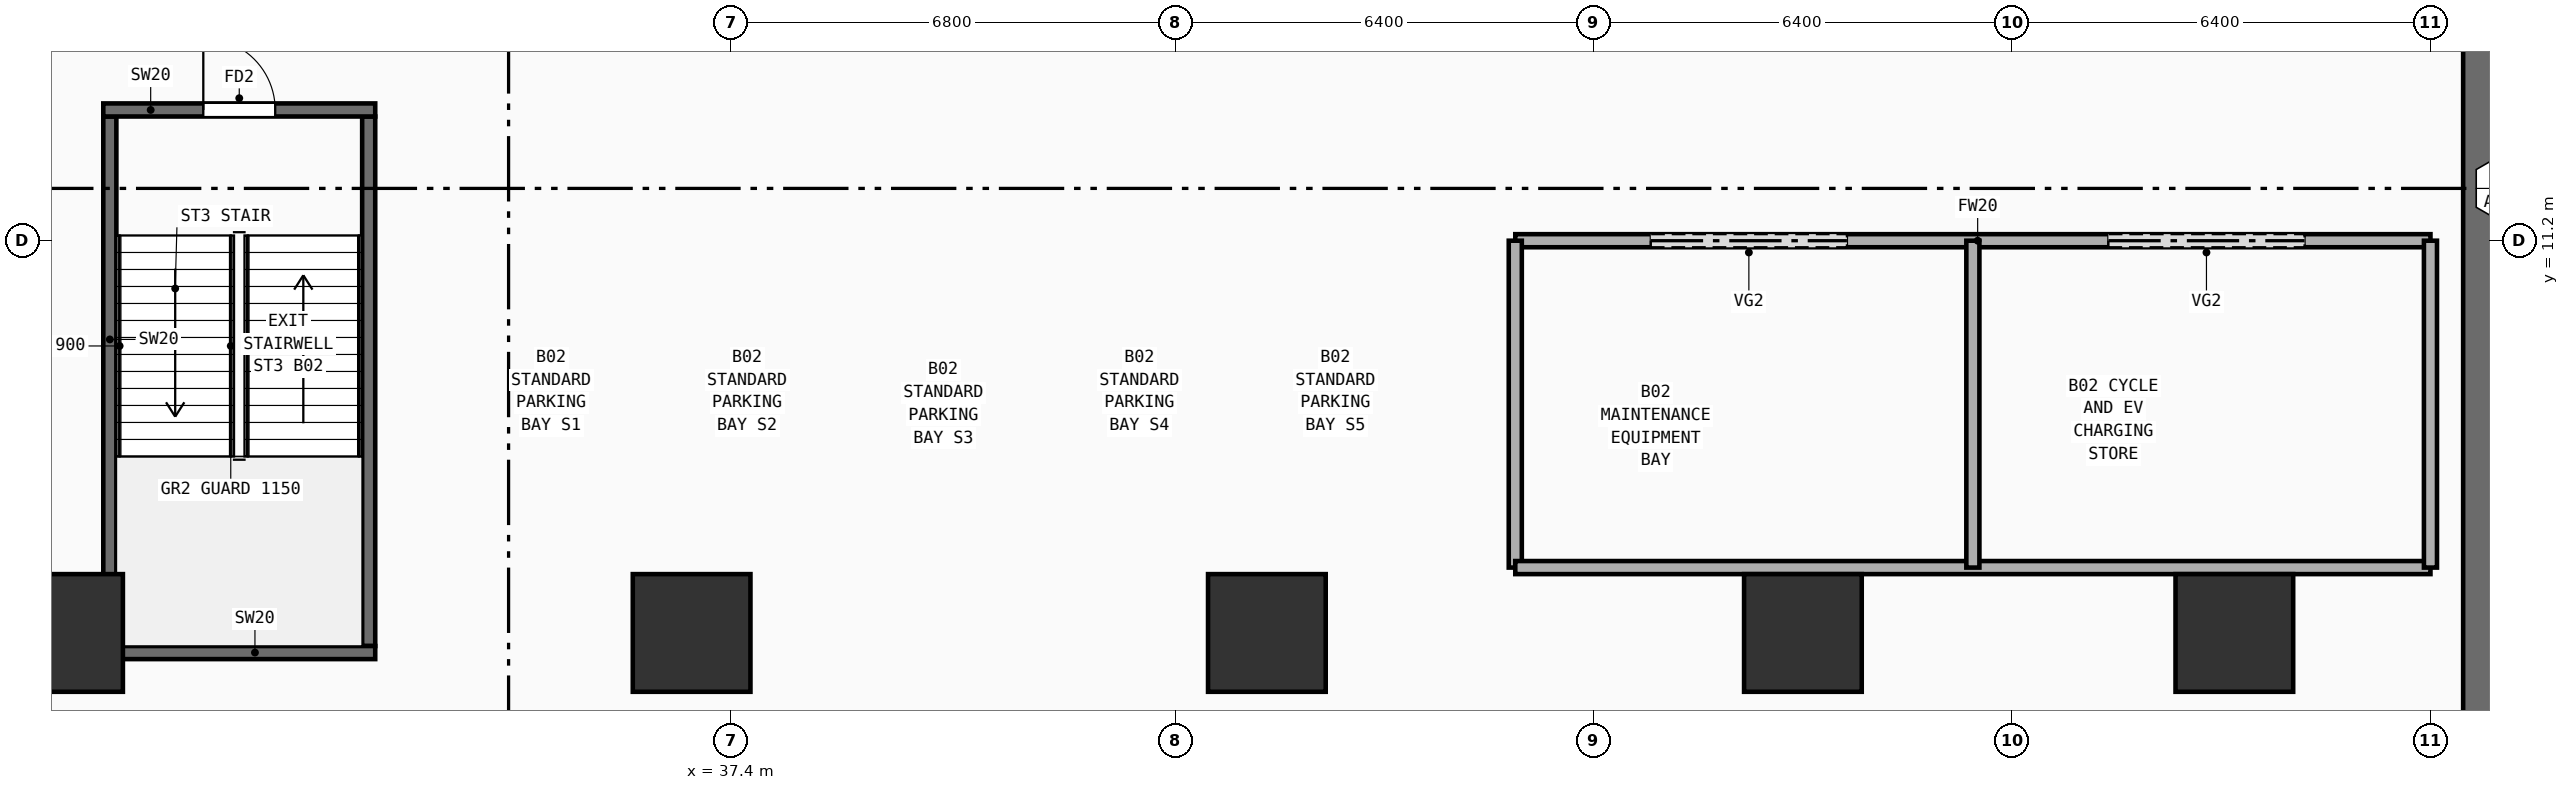
"""IFC4 building model, lengths in metres.
Left out: names, types, materials, properties, quantities, classifications, styles, units other than length and angle.
Written with IfcOpenShell. Run it as: python <this file> out.ifc"""

import sys

from ifc_helpers import new_model, si_unit, direction, frame, frame_2d, origin, origin_2d, place, context, subcontext, project, spatial, rectangle, extrude, element, fill, save


model = new_model("IFC4")
c1 = context("Model", 3, precision=1e-05, world=origin(), true_north=direction((0.0, 1.0)))
c2 = subcontext(c1, "Body", "Model", "MODEL_VIEW")
j1 = project(units=[si_unit("LENGTHUNIT", "METRE"), si_unit("PLANEANGLEUNIT", "RADIAN")], contexts=[c1])
p1 = place(None, origin())
s1 = spatial("IfcSite", under=j1, at=p1, CompositionType="ELEMENT")
p2 = place(p1, origin())
s2 = spatial("IfcBuilding", under=s1, at=p2, CompositionType="ELEMENT")
p3 = place(p2, frame((0.0, 0.0, -8.4)))
s3 = spatial("IfcBuildingStorey", under=s2, at=p3, CompositionType="ELEMENT", Elevation=-8.4)
p4 = place(p3, frame((64.4, 0.4, 0.0), z_axis=(0.0, 0.0, 1.0), x_axis=(0.0, 1.0, 0.0)))
e1 = element("IfcWall", 1, at=p4, inside=s3, PredefinedType="USERDEFINED", context=c2, shape_type="SweptSolid", body=[
    extrude(rectangle(XDim=50.4, YDim=1.0, at=frame_2d((25.2, 0.0))), origin(), (0.0, 0.0, 1.0), 3.86),
])
for number, where, z_axis, x_axis in (
    (2, (27.2, 5.2, 0.0), (0.0, 0.0, 1.0), (1.0, 0.0, 0.0)),
    (3, (36.8, 5.2, 0.0), (0.0, 0.0, 1.0), (1.0, 0.0, 0.0)),
    (4, (45.6, 5.2, 0.0), (0.0, 0.0, 1.0), (1.0, 0.0, 0.0)),
    (5, (53.8, 5.2, 0.0), (0.0, 0.0, 1.0), (1.0, 0.0, 0.0)),
    (6, (60.4, 5.2, 0.0), (0.0, 0.0, 1.0), (1.0, 0.0, 0.0)),
):
    element("IfcColumn", number, at=place(p3, frame(where, z_axis=z_axis, x_axis=x_axis)), inside=s3, PredefinedType="COLUMN", context=c2, shape_type="SweptSolid", body=[
        extrude(rectangle(XDim=1.8, YDim=1.8, at=origin_2d()), origin(), (0.0, 0.0, 1.0), 3.86),
    ])
for number, where, z_axis, x_axis in (
    (7, (27.9, 5.0, 0.0), (0.0, 0.0, 1.0), (0.0, 1.0, 0.0)),
    (8, (31.86, 5.0, 0.0), (0.0, 0.0, 1.0), (0.0, 1.0, 0.0)),
):
    element("IfcWall", number, at=place(p3, frame(where, z_axis=z_axis, x_axis=x_axis)), inside=s3, PredefinedType="SHEAR", context=c2, shape_type="SweptSolid", body=[
        extrude(rectangle(XDim=8.1, YDim=0.2, at=frame_2d((4.05, 0.0))), origin(), (0.0, 0.0, 1.0), 3.86),
    ])
p5 = place(p3, frame((27.8, 4.9, 0.0), z_axis=(0.0, 0.0, 1.0), x_axis=(1.0, 0.0, 0.0)))
e9 = element("IfcWall", 9, at=p5, inside=s3, PredefinedType="SHEAR", context=c2, shape_type="SweptSolid", body=[
    extrude(rectangle(XDim=4.16, YDim=0.2, at=frame_2d((2.08, 0.0))), origin(), (0.0, 0.0, 1.0), 3.86),
])
p6 = place(p3, frame((27.8, 13.2, 0.0), z_axis=(0.0, 0.0, 1.0), x_axis=(1.0, 0.0, 0.0)))
e10 = element("IfcWall", 10, at=p6, inside=s3, PredefinedType="SHEAR", context=c2, shape_type="SweptSolid", body=[
    extrude(rectangle(XDim=4.16, YDim=0.2, at=frame_2d((2.08, 0.0))), origin(), (0.0, 0.0, 1.0), 3.86),
])
p7 = place(p6, frame((1.53, 0.0, 0.0)))
e11 = element("IfcOpeningElement", 11, at=p7, cuts=e10, PredefinedType="OPENING", context=c2, shape_type="SweptSolid", body=[
    extrude(rectangle(XDim=1.1, YDim=2.2, at=frame_2d((0.55, 1.1))), frame((0.0, 0.11, 0.0), z_axis=(0.0, -1.0, 0.0), x_axis=(1.0, 0.0, 0.0)), (0.0, 0.0, 1.0), 0.22),
])
p8 = place(p3, frame((49.4, 11.2, 0.0), z_axis=(0.0, 0.0, 1.0), x_axis=(1.0, 0.0, 0.0)))
e12 = element("IfcWall", 12, at=p8, inside=s3, PredefinedType="PARTITIONING", context=c2, shape_type="SweptSolid", body=[
    extrude(rectangle(XDim=14.0, YDim=0.2, at=frame_2d((7.0, 0.0))), origin(), (0.0, 0.0, 1.0), 3.86),
])
p9 = place(p8, frame((2.073, 0.0, 0.0)))
e13 = element("IfcOpeningElement", 13, at=p9, cuts=e12, PredefinedType="OPENING", context=c2, shape_type="SweptSolid", body=[
    extrude(rectangle(XDim=3.0, YDim=2.8, at=frame_2d((1.5, 1.4))), frame((0.0, 0.11, 0.0), z_axis=(0.0, -1.0, 0.0), x_axis=(1.0, 0.0, 0.0)), (0.0, 0.0, 1.0), 0.22),
])
p10 = place(p8, frame((9.073, 0.0, 0.0)))
e14 = element("IfcOpeningElement", 14, at=p10, cuts=e12, PredefinedType="OPENING", context=c2, shape_type="SweptSolid", body=[
    extrude(rectangle(XDim=3.0, YDim=2.8, at=frame_2d((1.5, 1.4))), frame((0.0, 0.11, 0.0), z_axis=(0.0, -1.0, 0.0), x_axis=(1.0, 0.0, 0.0)), (0.0, 0.0, 1.0), 0.22),
])
p11 = place(p3, frame((49.4, 6.2, 0.0), z_axis=(0.0, 0.0, 1.0), x_axis=(0.0, 1.0, 0.0)))
e15 = element("IfcWall", 15, at=p11, inside=s3, PredefinedType="PARTITIONING", context=c2, shape_type="SweptSolid", body=[
    extrude(rectangle(XDim=5.0, YDim=0.2, at=frame_2d((2.5, 0.0))), origin(), (0.0, 0.0, 1.0), 3.86),
])
p12 = place(p3, frame((49.4, 6.2, 0.0), z_axis=(0.0, 0.0, 1.0), x_axis=(1.0, 0.0, 0.0)))
e16 = element("IfcWall", 16, at=p12, inside=s3, PredefinedType="PARTITIONING", context=c2, shape_type="SweptSolid", body=[
    extrude(rectangle(XDim=14.0, YDim=0.2, at=frame_2d((7.0, 0.0))), origin(), (0.0, 0.0, 1.0), 3.86),
])
for number, where, z_axis, x_axis in (
    (17, (63.4, 6.2, 0.0), (0.0, 0.0, 1.0), (0.0, 1.0, 0.0)),
    (18, (56.4, 6.2, 0.0), (0.0, 0.0, 1.0), (0.0, 1.0, 0.0)),
):
    element("IfcWall", number, at=place(p3, frame(where, z_axis=z_axis, x_axis=x_axis)), inside=s3, PredefinedType="PARTITIONING", context=c2, shape_type="SweptSolid", body=[
        extrude(rectangle(XDim=5.0, YDim=0.2, at=frame_2d((2.5, 0.0))), origin(), (0.0, 0.0, 1.0), 3.86),
    ])
p13 = place(p7, frame((1.1, 0.0, 0.0), z_axis=(0.0, 0.0, 1.0), x_axis=(-1.0, 0.0, 0.0)))
e19 = element("IfcDoor", 19, at=p13, inside=s3, OperationType="SINGLE_SWING_RIGHT", PredefinedType="DOOR", context=c2, shape_type="SweptSolid", body=[
    extrude(rectangle(XDim=1.1, YDim=2.2, at=frame_2d((0.55, 1.1))), frame((0.0, 0.025, 0.0), z_axis=(0.0, -1.0, 0.0), x_axis=(1.0, 0.0, 0.0)), (0.0, 0.0, 1.0), 0.05),
])
fill(e11, e19)
p14 = place(p9, origin())
e20 = element("IfcDoor", 20, at=p14, inside=s3, OperationType="ROLLINGUP", PredefinedType="GATE", context=c2, shape_type="SweptSolid", body=[
    extrude(rectangle(XDim=3.0, YDim=2.8, at=frame_2d((1.5, 1.4))), frame((0.0, 0.025, 0.0), z_axis=(0.0, -1.0, 0.0), x_axis=(1.0, 0.0, 0.0)), (0.0, 0.0, 1.0), 0.05),
])
fill(e13, e20)
p15 = place(p10, origin())
e21 = element("IfcDoor", 21, at=p15, inside=s3, OperationType="ROLLINGUP", PredefinedType="GATE", context=c2, shape_type="SweptSolid", body=[
    extrude(rectangle(XDim=3.0, YDim=2.8, at=frame_2d((1.5, 1.4))), frame((0.0, 0.025, 0.0), z_axis=(0.0, -1.0, 0.0), x_axis=(1.0, 0.0, 0.0)), (0.0, 0.0, 1.0), 0.05),
])
fill(e14, e21)
save(model, sys.argv[1])
